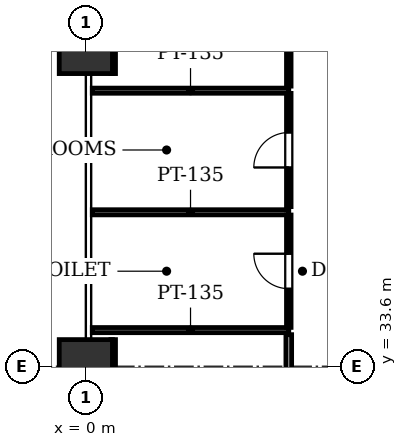
"""IFC4 building model, lengths in metres.
Left out: names, types, materials, properties, quantities, classifications, styles, units other than length and angle.
Written with IfcOpenShell. Run it as: python <this file> out.ifc"""

import sys

from ifc_helpers import new_model, si_unit, direction, frame, frame_2d, origin, origin_2d, place, context, subcontext, project, spatial, rectangle, extrude, element, fill, save


model = new_model("IFC4")
c1 = context("Model", 3, precision=1e-05, world=origin(), true_north=direction((0.0, 1.0)))
c2 = subcontext(c1, "Body", "Model", "MODEL_VIEW")
j1 = project(units=[si_unit("LENGTHUNIT", "METRE"), si_unit("PLANEANGLEUNIT", "RADIAN")], contexts=[c1])
p1 = place(None, origin())
s1 = spatial("IfcSite", under=j1, at=p1, CompositionType="ELEMENT")
p2 = place(p1, origin())
s2 = spatial("IfcBuilding", under=s1, at=p2, CompositionType="ELEMENT")
p3 = place(p2, frame((0.0, 0.0, 5.4)))
s3 = spatial("IfcBuildingStorey", under=s2, at=p3, CompositionType="ELEMENT", Elevation=5.4)
for number, where, z_axis, x_axis in (
    (1, (0.0, 33.6, 0.0), (0.0, 0.0, 1.0), (1.0, 0.0, 0.0)),
    (2, (0.0, 42.0, 0.0), (0.0, 0.0, 1.0), (1.0, 0.0, 0.0)),
):
    element("IfcColumn", number, at=place(p3, frame(where, z_axis=z_axis, x_axis=x_axis)), inside=s3, PredefinedType="COLUMN", context=c2, shape_type="SweptSolid", body=[
        extrude(rectangle(XDim=1.4, YDim=1.4, at=origin_2d()), origin(), (0.0, 0.0, 1.0), 4.8),
    ])
for number, where, z_axis, x_axis in (
    (3, (5.34, 37.65, 0.0), (0.0, 0.0, 1.0), (-1.0, 0.0, 0.0)),
    (4, (0.169, 34.55, 0.0), (0.0, 0.0, 1.0), (1.0, 0.0, 0.0)),
):
    element("IfcWall", number, at=place(p3, frame(where, z_axis=z_axis, x_axis=x_axis)), inside=s3, PredefinedType="PARTITIONING", context=c2, shape_type="SweptSolid", body=[
        extrude(rectangle(XDim=5.171, YDim=0.135, at=frame_2d((2.585, 0.0))), origin(), (0.0, 0.0, 1.0), 4.122),
    ])
p4 = place(p3, frame((5.34, 34.622, 0.0), z_axis=(0.0, 0.0, 1.0), x_axis=(0.0, 1.0, 0.0)))
e5 = element("IfcWall", 5, at=p4, inside=s3, PredefinedType="PARTITIONING", context=c2, shape_type="SweptSolid", body=[
    extrude(rectangle(XDim=2.957, YDim=0.12, at=frame_2d((1.479, 0.0))), origin(), (0.0, 0.0, 1.0), 4.525),
])
p5 = place(p4, frame((1.019, 0.0, 0.0)))
e6 = element("IfcOpeningElement", 6, at=p5, cuts=e5, PredefinedType="OPENING", context=c2, shape_type="SweptSolid", body=[
    extrude(rectangle(XDim=0.92, YDim=2.1, at=frame_2d((0.46, 1.05))), frame((0.0, 0.07, 0.0), z_axis=(0.0, -1.0, 0.0), x_axis=(1.0, 0.0, 0.0)), (0.0, 0.0, 1.0), 0.14),
])
p6 = place(p3, frame((5.34, 40.85, 0.0), z_axis=(0.0, 0.0, 1.0), x_axis=(-1.0, 0.0, 0.0)))
e7 = element("IfcWall", 7, at=p6, inside=s3, PredefinedType="PARTITIONING", context=c2, shape_type="SweptSolid", body=[
    extrude(rectangle(XDim=5.171, YDim=0.135, at=frame_2d((2.585, 0.0))), origin(), (0.0, 0.0, 1.0), 4.122),
])
p7 = place(p3, frame((5.34, 37.8, 0.0), z_axis=(0.0, 0.0, 1.0), x_axis=(0.0, 1.0, 0.0)))
e8 = element("IfcWall", 8, at=p7, inside=s3, PredefinedType="PARTITIONING", context=c2, shape_type="SweptSolid", body=[
    extrude(rectangle(XDim=2.979, YDim=0.12, at=frame_2d((1.489, 0.0))), origin(), (0.0, 0.0, 1.0), 4.525),
])
p8 = place(p7, frame((1.029, 0.0, 0.0)))
e9 = element("IfcOpeningElement", 9, at=p8, cuts=e8, PredefinedType="OPENING", context=c2, shape_type="SweptSolid", body=[
    extrude(rectangle(XDim=0.92, YDim=2.1, at=frame_2d((0.46, 1.05))), frame((0.0, 0.07, 0.0), z_axis=(0.0, -1.0, 0.0), x_axis=(1.0, 0.0, 0.0)), (0.0, 0.0, 1.0), 0.14),
])
p9 = place(p3, frame((0.72, 42.7, 0.0), z_axis=(0.0, 0.0, 1.0), x_axis=(0.0, -1.0, 0.0)))
e10 = element("IfcWall", 10, at=p9, inside=s3, PredefinedType="PARTITIONING", context=c2, shape_type="SweptSolid", body=[
    extrude(rectangle(XDim=1.4, YDim=0.12, at=frame_2d((0.7, 0.0))), origin(), (0.0, 0.0, 1.0), 3.725),
])
p10 = place(p3, frame((5.34, 40.97, 0.0), z_axis=(0.0, 0.0, 1.0), x_axis=(0.0, 1.0, 0.0)))
e11 = element("IfcWall", 11, at=p10, inside=s3, PredefinedType="PARTITIONING", context=c2, shape_type="SweptSolid", body=[
    extrude(rectangle(XDim=1.03, YDim=0.12, at=frame_2d((0.515, 0.0))), origin(), (0.0, 0.0, 1.0), 3.725),
])
p11 = place(p3, frame((5.34, 5.4, 0.0), z_axis=(0.0, 0.0, 1.0), x_axis=(0.0, 1.0, 0.0)))
e12 = element("IfcWall", 12, at=p11, inside=s3, PredefinedType="PARTITIONING", context=c2, shape_type="SweptSolid", body=[
    extrude(rectangle(XDim=29.03, YDim=0.15, at=frame_2d((14.515, 0.0))), origin(), (0.0, 0.0, 1.0), 3.725),
])
p12 = place(p11, frame((14.04, 0.0, 0.0)))
e13 = element("IfcOpeningElement", 13, at=p12, cuts=e12, PredefinedType="OPENING", context=c2, shape_type="SweptSolid", body=[
    extrude(rectangle(XDim=0.95, YDim=2.15, at=frame_2d((0.475, 1.075))), frame((0.0, 0.085, 0.0), z_axis=(0.0, -1.0, 0.0), x_axis=(1.0, 0.0, 0.0)), (0.0, 0.0, 1.0), 0.17),
])
p13 = place(p3, frame((0.72, 34.3, 0.0), z_axis=(0.0, 0.0, 1.0), x_axis=(0.0, -1.0, 0.0)))
e14 = element("IfcWall", 14, at=p13, inside=s3, PredefinedType="PARTITIONING", context=c2, shape_type="SweptSolid", body=[
    extrude(rectangle(XDim=1.4, YDim=0.12, at=frame_2d((0.7, 0.0))), origin(), (0.0, 0.0, 1.0), 3.725),
])
p14 = place(p5, origin())
e15 = element("IfcDoor", 15, at=p14, inside=s3, OperationType="SINGLE_SWING_RIGHT", PredefinedType="DOOR", context=c2, shape_type="SweptSolid", body=[
    extrude(rectangle(XDim=0.92, YDim=2.1, at=frame_2d((0.46, 1.05))), frame((0.0, 0.025, 0.0), z_axis=(0.0, -1.0, 0.0), x_axis=(1.0, 0.0, 0.0)), (0.0, 0.0, 1.0), 0.05),
])
fill(e6, e15)
p15 = place(p8, origin())
e16 = element("IfcDoor", 16, at=p15, inside=s3, OperationType="SINGLE_SWING_LEFT", PredefinedType="DOOR", context=c2, shape_type="SweptSolid", body=[
    extrude(rectangle(XDim=0.92, YDim=2.1, at=frame_2d((0.46, 1.05))), frame((0.0, 0.025, 0.0), z_axis=(0.0, -1.0, 0.0), x_axis=(1.0, 0.0, 0.0)), (0.0, 0.0, 1.0), 0.05),
])
fill(e9, e16)
save(model, sys.argv[1])
